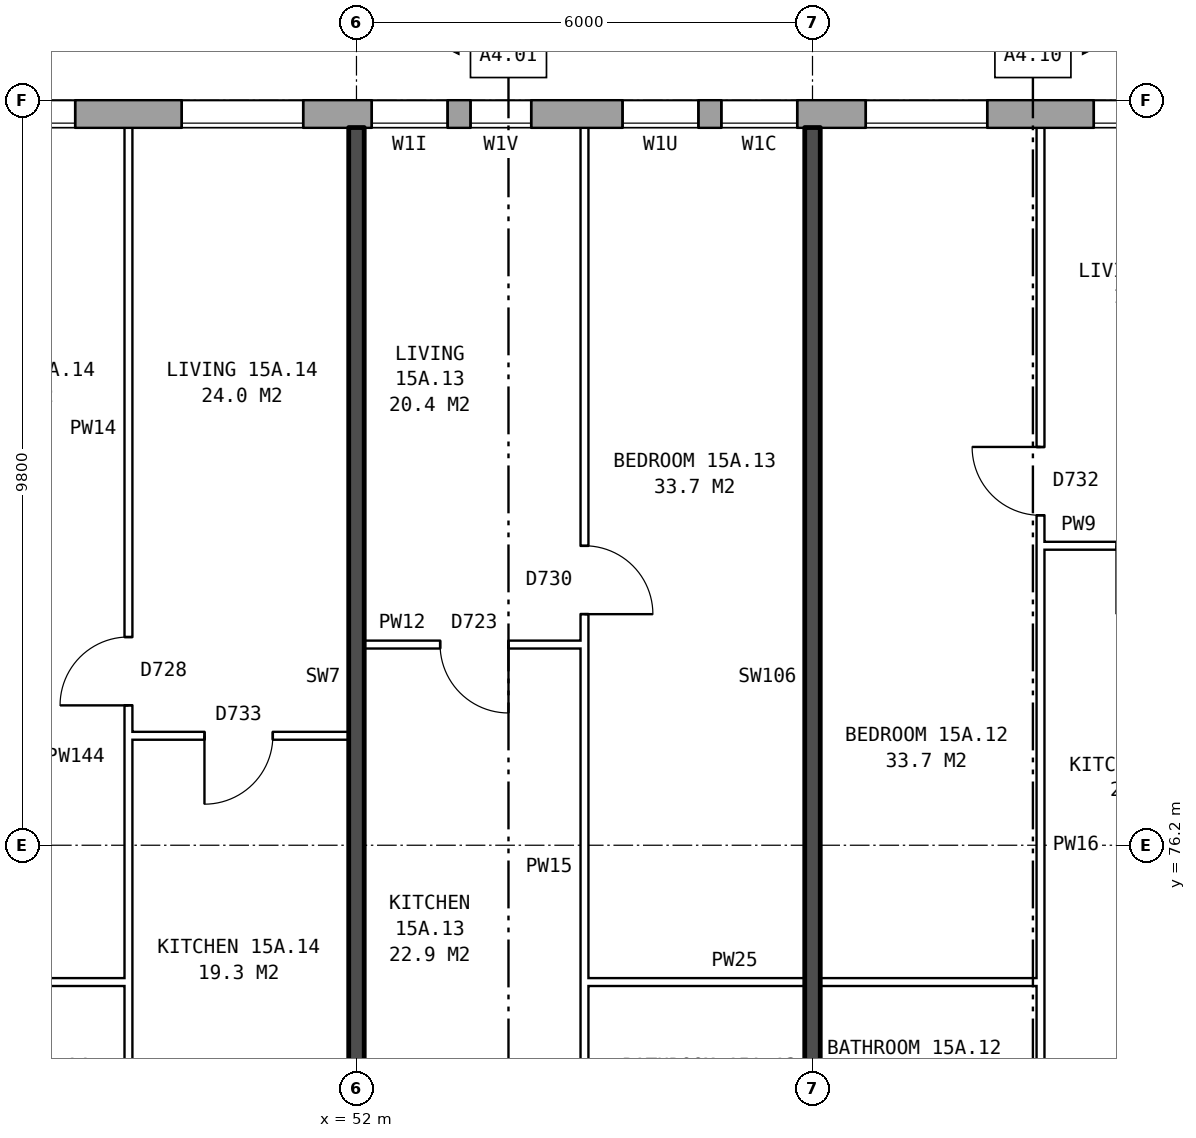
"""IFC4 building model, lengths in metres.
Left out: names, types, materials, properties, quantities, classifications, styles, units other than length and angle.
Written with IfcOpenShell. Run it as: python <this file> out.ifc"""

import sys

from ifc_helpers import new_model, si_unit, direction, frame, frame_2d, origin, place, context, subcontext, project, spatial, rectangle, extrude, element, fill, save


model = new_model("IFC4")
c1 = context("Model", 3, precision=1e-05, world=origin(), true_north=direction((0.0, 1.0)))
c2 = subcontext(c1, "Body", "Model", "MODEL_VIEW")
j1 = project(units=[si_unit("LENGTHUNIT", "METRE"), si_unit("PLANEANGLEUNIT", "RADIAN")], contexts=[c1])
p1 = place(None, origin())
s1 = spatial("IfcSite", under=j1, at=p1, CompositionType="ELEMENT")
p2 = place(p1, origin())
s2 = spatial("IfcBuilding", under=s1, at=p2, CompositionType="ELEMENT")
p3 = place(p2, frame((0.0, 0.0, 56.7)))
s3 = spatial("IfcBuildingStorey", under=s2, at=p3, CompositionType="ELEMENT", Elevation=56.7)
p4 = place(p3, frame((72.925, 85.82, 0.0), z_axis=(0.0, 0.0, 1.0), x_axis=(-1.0, 0.0, 0.0)))
e1 = element("IfcWall", 1, at=p4, inside=s3, PredefinedType="STANDARD", context=c2, shape_type="SweptSolid", body=[
    extrude(rectangle(XDim=48.351, YDim=0.36, at=frame_2d((24.175, 0.0))), origin(), (0.0, 0.0, 1.0), 2.85),
])
p5 = place(p4, frame((0.625, 0.0, 0.8)))
e2 = element("IfcOpeningElement", 2, at=p5, cuts=e1, PredefinedType="OPENING", context=c2, shape_type="SweptSolid", body=[
    extrude(rectangle(XDim=1.6, YDim=1.8, at=frame_2d((0.8, 0.9))), frame((0.0, 0.19, 0.0), z_axis=(0.0, -1.0, 0.0), x_axis=(1.0, 0.0, 0.0)), (0.0, 0.0, 1.0), 0.38),
])
p6 = place(p4, frame((3.625, 0.0, 0.8)))
e3 = element("IfcOpeningElement", 3, at=p6, cuts=e1, PredefinedType="OPENING", context=c2, shape_type="SweptSolid", body=[
    extrude(rectangle(XDim=1.6, YDim=1.8, at=frame_2d((0.8, 0.9))), frame((0.0, 0.19, 0.0), z_axis=(0.0, -1.0, 0.0), x_axis=(1.0, 0.0, 0.0)), (0.0, 0.0, 1.0), 0.38),
])
p7 = place(p4, frame((6.625, 0.0, 0.8)))
e4 = element("IfcOpeningElement", 4, at=p7, cuts=e1, PredefinedType="OPENING", context=c2, shape_type="SweptSolid", body=[
    extrude(rectangle(XDim=1.6, YDim=1.8, at=frame_2d((0.8, 0.9))), frame((0.0, 0.19, 0.0), z_axis=(0.0, -1.0, 0.0), x_axis=(1.0, 0.0, 0.0)), (0.0, 0.0, 1.0), 0.38),
])
p8 = place(p4, frame((9.625, 0.0, 0.8)))
e5 = element("IfcOpeningElement", 5, at=p8, cuts=e1, PredefinedType="OPENING", context=c2, shape_type="SweptSolid", body=[
    extrude(rectangle(XDim=1.6, YDim=1.8, at=frame_2d((0.8, 0.9))), frame((0.0, 0.19, 0.0), z_axis=(0.0, -1.0, 0.0), x_axis=(1.0, 0.0, 0.0)), (0.0, 0.0, 1.0), 0.38),
])
p9 = place(p4, frame((12.625, 0.0, 0.8)))
e6 = element("IfcOpeningElement", 6, at=p9, cuts=e1, PredefinedType="OPENING", context=c2, shape_type="SweptSolid", body=[
    extrude(rectangle(XDim=1.6, YDim=1.8, at=frame_2d((0.8, 0.9))), frame((0.0, 0.19, 0.0), z_axis=(0.0, -1.0, 0.0), x_axis=(1.0, 0.0, 0.0)), (0.0, 0.0, 1.0), 0.38),
])
p10 = place(p4, frame((15.125, 0.0, 0.8)))
e7 = element("IfcOpeningElement", 7, at=p10, cuts=e1, PredefinedType="OPENING", context=c2, shape_type="SweptSolid", body=[
    extrude(rectangle(XDim=1.0, YDim=1.8, at=frame_2d((0.5, 0.9))), frame((0.0, 0.19, 0.0), z_axis=(0.0, -1.0, 0.0), x_axis=(1.0, 0.0, 0.0)), (0.0, 0.0, 1.0), 0.38),
])
p11 = place(p4, frame((18.625, 0.0, 0.65)))
e8 = element("IfcOpeningElement", 8, at=p11, cuts=e1, PredefinedType="OPENING", context=c2, shape_type="SweptSolid", body=[
    extrude(rectangle(XDim=0.8, YDim=0.9, at=frame_2d((0.4, 0.45))), frame((0.0, 0.19, 0.0), z_axis=(0.0, -1.0, 0.0), x_axis=(1.0, 0.0, 0.0)), (0.0, 0.0, 1.0), 0.38),
])
p12 = place(p4, frame((21.625, 0.0, 0.8)))
e9 = element("IfcOpeningElement", 9, at=p12, cuts=e1, PredefinedType="OPENING", context=c2, shape_type="SweptSolid", body=[
    extrude(rectangle(XDim=1.6, YDim=1.8, at=frame_2d((0.8, 0.9))), frame((0.0, 0.19, 0.0), z_axis=(0.0, -1.0, 0.0), x_axis=(1.0, 0.0, 0.0)), (0.0, 0.0, 1.0), 0.38),
])
p13 = place(p4, frame((24.625, 0.0, 0.8)))
e10 = element("IfcOpeningElement", 10, at=p13, cuts=e1, PredefinedType="OPENING", context=c2, shape_type="SweptSolid", body=[
    extrude(rectangle(XDim=1.6, YDim=1.8, at=frame_2d((0.8, 0.9))), frame((0.0, 0.19, 0.0), z_axis=(0.0, -1.0, 0.0), x_axis=(1.0, 0.0, 0.0)), (0.0, 0.0, 1.0), 0.38),
])
p14 = place(p4, frame((27.125, 0.0, 0.8)))
e11 = element("IfcOpeningElement", 11, at=p14, cuts=e1, PredefinedType="OPENING", context=c2, shape_type="SweptSolid", body=[
    extrude(rectangle(XDim=1.0, YDim=1.8, at=frame_2d((0.5, 0.9))), frame((0.0, 0.19, 0.0), z_axis=(0.0, -1.0, 0.0), x_axis=(1.0, 0.0, 0.0)), (0.0, 0.0, 1.0), 0.38),
])
p15 = place(p4, frame((28.425, 0.0, 0.8)))
e12 = element("IfcOpeningElement", 12, at=p15, cuts=e1, PredefinedType="OPENING", context=c2, shape_type="SweptSolid", body=[
    extrude(rectangle(XDim=1.0, YDim=0.9, at=frame_2d((0.5, 0.45))), frame((0.0, 0.19, 0.0), z_axis=(0.0, -1.0, 0.0), x_axis=(1.0, 0.0, 0.0)), (0.0, 0.0, 1.0), 0.38),
])
p16 = place(p4, frame((33.625, 0.0, 0.8)))
e13 = element("IfcOpeningElement", 13, at=p16, cuts=e1, PredefinedType="OPENING", context=c2, shape_type="SweptSolid", body=[
    extrude(rectangle(XDim=1.6, YDim=1.8, at=frame_2d((0.8, 0.9))), frame((0.0, 0.19, 0.0), z_axis=(0.0, -1.0, 0.0), x_axis=(1.0, 0.0, 0.0)), (0.0, 0.0, 1.0), 0.38),
])
p17 = place(p4, frame((36.625, 0.0, 0.8)))
e14 = element("IfcOpeningElement", 14, at=p17, cuts=e1, PredefinedType="OPENING", context=c2, shape_type="SweptSolid", body=[
    extrude(rectangle(XDim=1.6, YDim=1.8, at=frame_2d((0.8, 0.9))), frame((0.0, 0.19, 0.0), z_axis=(0.0, -1.0, 0.0), x_axis=(1.0, 0.0, 0.0)), (0.0, 0.0, 1.0), 0.38),
])
p18 = place(p4, frame((39.625, 0.0, 0.8)))
e15 = element("IfcOpeningElement", 15, at=p18, cuts=e1, PredefinedType="OPENING", context=c2, shape_type="SweptSolid", body=[
    extrude(rectangle(XDim=1.6, YDim=1.8, at=frame_2d((0.8, 0.9))), frame((0.0, 0.19, 0.0), z_axis=(0.0, -1.0, 0.0), x_axis=(1.0, 0.0, 0.0)), (0.0, 0.0, 1.0), 0.38),
])
p19 = place(p4, frame((42.625, 0.0, 0.8)))
e16 = element("IfcOpeningElement", 16, at=p19, cuts=e1, PredefinedType="OPENING", context=c2, shape_type="SweptSolid", body=[
    extrude(rectangle(XDim=1.6, YDim=1.8, at=frame_2d((0.8, 0.9))), frame((0.0, 0.19, 0.0), z_axis=(0.0, -1.0, 0.0), x_axis=(1.0, 0.0, 0.0)), (0.0, 0.0, 1.0), 0.38),
])
p20 = place(p4, frame((45.625, 0.0, 0.8)))
e17 = element("IfcOpeningElement", 17, at=p20, cuts=e1, PredefinedType="OPENING", context=c2, shape_type="SweptSolid", body=[
    extrude(rectangle(XDim=1.6, YDim=1.8, at=frame_2d((0.8, 0.9))), frame((0.0, 0.19, 0.0), z_axis=(0.0, -1.0, 0.0), x_axis=(1.0, 0.0, 0.0)), (0.0, 0.0, 1.0), 0.38),
])
p21 = place(p4, frame((16.425, 0.0, 1.7)))
e18 = element("IfcOpeningElement", 18, at=p21, cuts=e1, PredefinedType="OPENING", context=c2, shape_type="SweptSolid", body=[
    extrude(rectangle(XDim=1.0, YDim=0.9, at=frame_2d((0.5, 0.45))), frame((0.0, 0.19, 0.0), z_axis=(0.0, -1.0, 0.0), x_axis=(1.0, 0.0, 0.0)), (0.0, 0.0, 1.0), 0.38),
])
p22 = place(p4, frame((19.725, 0.0, 0.75)))
e19 = element("IfcOpeningElement", 19, at=p22, cuts=e1, PredefinedType="OPENING", context=c2, shape_type="SweptSolid", body=[
    extrude(rectangle(XDim=1.0, YDim=1.5, at=frame_2d((0.5, 0.75))), frame((0.0, 0.19, 0.0), z_axis=(0.0, -1.0, 0.0), x_axis=(1.0, 0.0, 0.0)), (0.0, 0.0, 1.0), 0.38),
])
p23 = place(p4, frame((30.875, 0.0, 1.7)))
e20 = element("IfcOpeningElement", 20, at=p23, cuts=e1, PredefinedType="OPENING", context=c2, shape_type="SweptSolid", body=[
    extrude(rectangle(XDim=0.6, YDim=0.9, at=frame_2d((0.3, 0.45))), frame((0.0, 0.19, 0.0), z_axis=(0.0, -1.0, 0.0), x_axis=(1.0, 0.0, 0.0)), (0.0, 0.0, 1.0), 0.38),
])
p24 = place(p4, frame((31.775, 0.0, 1.1)))
e21 = element("IfcOpeningElement", 21, at=p24, cuts=e1, PredefinedType="OPENING", context=c2, shape_type="SweptSolid", body=[
    extrude(rectangle(XDim=0.8, YDim=1.5, at=frame_2d((0.4, 0.75))), frame((0.0, 0.19, 0.0), z_axis=(0.0, -1.0, 0.0), x_axis=(1.0, 0.0, 0.0)), (0.0, 0.0, 1.0), 0.38),
])
p25 = place(p3, frame((46.1, 74.4, 0.0), z_axis=(0.0, 0.0, 1.0), x_axis=(1.0, 0.0, 0.0)))
e22 = element("IfcWall", 22, at=p25, inside=s3, PredefinedType="PARTITIONING", context=c2, shape_type="SweptSolid", body=[
    extrude(rectangle(XDim=2.9, YDim=0.1, at=frame_2d((1.45, 0.0))), origin(), (0.0, 0.0, 1.0), 2.85),
])
p26 = place(p3, frame((55.0, 74.4, 0.0), z_axis=(0.0, 0.0, 1.0), x_axis=(1.0, 0.0, 0.0)))
e23 = element("IfcWall", 23, at=p26, inside=s3, PredefinedType="PARTITIONING", context=c2, shape_type="SweptSolid", body=[
    extrude(rectangle(XDim=6.0, YDim=0.1, at=frame_2d((3.0, 0.0))), origin(), (0.0, 0.0, 1.0), 2.85),
])
p27 = place(p3, frame((49.0, 77.64, 0.0), z_axis=(0.0, 0.0, 1.0), x_axis=(1.0, 0.0, 0.0)))
e24 = element("IfcWall", 24, at=p27, inside=s3, PredefinedType="PARTITIONING", context=c2, shape_type="SweptSolid", body=[
    extrude(rectangle(XDim=2.9, YDim=0.1, at=frame_2d((1.45, 0.0))), origin(), (0.0, 0.0, 1.0), 2.85),
])
p28 = place(p27, frame((1.0, 0.0, 0.0)))
e25 = element("IfcOpeningElement", 25, at=p28, cuts=e24, PredefinedType="OPENING", context=c2, shape_type="SweptSolid", body=[
    extrude(rectangle(XDim=0.9, YDim=2.1, at=frame_2d((0.45, 1.05))), frame((0.0, 0.06, 0.0), z_axis=(0.0, -1.0, 0.0), x_axis=(1.0, 0.0, 0.0)), (0.0, 0.0, 1.0), 0.12),
])
p29 = place(p3, frame((52.1, 78.84, 0.0), z_axis=(0.0, 0.0, 1.0), x_axis=(1.0, 0.0, 0.0)))
e26 = element("IfcWall", 26, at=p29, inside=s3, PredefinedType="PARTITIONING", context=c2, shape_type="SweptSolid", body=[
    extrude(rectangle(XDim=2.9, YDim=0.1, at=frame_2d((1.45, 0.0))), origin(), (0.0, 0.0, 1.0), 2.85),
])
p30 = place(p29, frame((1.0, 0.0, 0.0)))
e27 = element("IfcOpeningElement", 27, at=p30, cuts=e26, PredefinedType="OPENING", context=c2, shape_type="SweptSolid", body=[
    extrude(rectangle(XDim=0.9, YDim=2.1, at=frame_2d((0.45, 1.05))), frame((0.0, 0.06, 0.0), z_axis=(0.0, -1.0, 0.0), x_axis=(1.0, 0.0, 0.0)), (0.0, 0.0, 1.0), 0.12),
])
p31 = place(p3, frame((61.0, 80.14, 0.0), z_axis=(0.0, 0.0, 1.0), x_axis=(1.0, 0.0, 0.0)))
e28 = element("IfcWall", 28, at=p31, inside=s3, PredefinedType="PARTITIONING", context=c2, shape_type="SweptSolid", body=[
    extrude(rectangle(XDim=2.9, YDim=0.1, at=frame_2d((1.45, 0.0))), origin(), (0.0, 0.0, 1.0), 2.85),
])
p32 = place(p31, frame((1.0, 0.0, 0.0)))
e29 = element("IfcOpeningElement", 29, at=p32, cuts=e28, PredefinedType="OPENING", context=c2, shape_type="SweptSolid", body=[
    extrude(rectangle(XDim=0.9, YDim=2.1, at=frame_2d((0.45, 1.05))), frame((0.0, 0.06, 0.0), z_axis=(0.0, -1.0, 0.0), x_axis=(1.0, 0.0, 0.0)), (0.0, 0.0, 1.0), 0.12),
])
p33 = place(p3, frame((49.0, 71.3, 0.0), z_axis=(0.0, 0.0, 1.0), x_axis=(0.0, 1.0, 0.0)))
e30 = element("IfcWall", 30, at=p33, inside=s3, PredefinedType="PARTITIONING", context=c2, shape_type="SweptSolid", body=[
    extrude(rectangle(XDim=14.34, YDim=0.1, at=frame_2d((7.17, 0.0))), origin(), (0.0, 0.0, 1.0), 2.85),
])
p34 = place(p33, frame((6.74, 0.0, 0.0)))
e31 = element("IfcOpeningElement", 31, at=p34, cuts=e30, PredefinedType="OPENING", context=c2, shape_type="SweptSolid", body=[
    extrude(rectangle(XDim=0.9, YDim=2.1, at=frame_2d((0.45, 1.05))), frame((0.0, 0.06, 0.0), z_axis=(0.0, -1.0, 0.0), x_axis=(1.0, 0.0, 0.0)), (0.0, 0.0, 1.0), 0.12),
])
p35 = place(p33, frame((0.4, 0.0, 0.0)))
e32 = element("IfcOpeningElement", 32, at=p35, cuts=e30, PredefinedType="OPENING", context=c2, shape_type="SweptSolid", body=[
    extrude(rectangle(XDim=0.9, YDim=2.1, at=frame_2d((0.45, 1.05))), frame((0.0, 0.06, 0.0), z_axis=(0.0, -1.0, 0.0), x_axis=(1.0, 0.0, 0.0)), (0.0, 0.0, 1.0), 0.12),
])
p36 = place(p3, frame((52.0, 71.2, 0.0), z_axis=(0.0, 0.0, 1.0), x_axis=(0.0, 1.0, 0.0)))
e33 = element("IfcWall", 33, at=p36, inside=s3, PredefinedType="SOLIDWALL", context=c2, shape_type="SweptSolid", body=[
    extrude(rectangle(XDim=14.44, YDim=0.2, at=frame_2d((7.22, 0.0))), origin(), (0.0, 0.0, 1.0), 2.85),
])
p37 = place(p3, frame((55.0, 71.3, 0.0), z_axis=(0.0, 0.0, 1.0), x_axis=(0.0, 1.0, 0.0)))
e34 = element("IfcWall", 34, at=p37, inside=s3, PredefinedType="PARTITIONING", context=c2, shape_type="SweptSolid", body=[
    extrude(rectangle(XDim=14.34, YDim=0.1, at=frame_2d((7.17, 0.0))), origin(), (0.0, 0.0, 1.0), 2.85),
])
p38 = place(p37, frame((7.94, 0.0, 0.0)))
e35 = element("IfcOpeningElement", 35, at=p38, cuts=e34, PredefinedType="OPENING", context=c2, shape_type="SweptSolid", body=[
    extrude(rectangle(XDim=0.9, YDim=2.1, at=frame_2d((0.45, 1.05))), frame((0.0, 0.06, 0.0), z_axis=(0.0, -1.0, 0.0), x_axis=(1.0, 0.0, 0.0)), (0.0, 0.0, 1.0), 0.12),
])
p39 = place(p37, frame((0.4, 0.0, 0.0)))
e36 = element("IfcOpeningElement", 36, at=p39, cuts=e34, PredefinedType="OPENING", context=c2, shape_type="SweptSolid", body=[
    extrude(rectangle(XDim=0.9, YDim=2.1, at=frame_2d((0.45, 1.05))), frame((0.0, 0.06, 0.0), z_axis=(0.0, -1.0, 0.0), x_axis=(1.0, 0.0, 0.0)), (0.0, 0.0, 1.0), 0.12),
])
p40 = place(p3, frame((58.0, 71.2, 0.0), z_axis=(0.0, 0.0, 1.0), x_axis=(0.0, 1.0, 0.0)))
e37 = element("IfcWall", 37, at=p40, inside=s3, PredefinedType="SOLIDWALL", context=c2, shape_type="SweptSolid", body=[
    extrude(rectangle(XDim=14.44, YDim=0.2, at=frame_2d((7.22, 0.0))), origin(), (0.0, 0.0, 1.0), 2.85),
])
p41 = place(p3, frame((61.0, 71.3, 0.0), z_axis=(0.0, 0.0, 1.0), x_axis=(0.0, 1.0, 0.0)))
e38 = element("IfcWall", 38, at=p41, inside=s3, PredefinedType="PARTITIONING", context=c2, shape_type="SweptSolid", body=[
    extrude(rectangle(XDim=14.34, YDim=0.1, at=frame_2d((7.17, 0.0))), origin(), (0.0, 0.0, 1.0), 2.85),
])
p42 = place(p41, frame((9.24, 0.0, 0.0)))
e39 = element("IfcOpeningElement", 39, at=p42, cuts=e38, PredefinedType="OPENING", context=c2, shape_type="SweptSolid", body=[
    extrude(rectangle(XDim=0.9, YDim=2.1, at=frame_2d((0.45, 1.05))), frame((0.0, 0.06, 0.0), z_axis=(0.0, -1.0, 0.0), x_axis=(1.0, 0.0, 0.0)), (0.0, 0.0, 1.0), 0.12),
])
p43 = place(p41, frame((0.9, 0.0, 0.0)))
e40 = element("IfcOpeningElement", 40, at=p43, cuts=e38, PredefinedType="OPENING", context=c2, shape_type="SweptSolid", body=[
    extrude(rectangle(XDim=0.9, YDim=2.1, at=frame_2d((0.45, 1.05))), frame((0.0, 0.06, 0.0), z_axis=(0.0, -1.0, 0.0), x_axis=(1.0, 0.0, 0.0)), (0.0, 0.0, 1.0), 0.12),
])
p44 = place(p8, origin())
e41 = element("IfcWindow", 41, at=p44, inside=s3, PartitioningType="SINGLE_PANEL", PredefinedType="WINDOW", context=c2, shape_type="SweptSolid", body=[
    extrude(rectangle(XDim=1.6, YDim=1.8, at=frame_2d((0.8, 0.9))), frame((0.0, 0.15, 0.0), z_axis=(0.0, -1.0, 0.0), x_axis=(1.0, 0.0, 0.0)), (0.0, 0.0, 1.0), 0.06),
])
fill(e5, e41)
p45 = place(p9, origin())
e42 = element("IfcWindow", 42, at=p45, inside=s3, PartitioningType="SINGLE_PANEL", PredefinedType="WINDOW", context=c2, shape_type="SweptSolid", body=[
    extrude(rectangle(XDim=1.6, YDim=1.8, at=frame_2d((0.8, 0.9))), frame((0.0, 0.15, 0.0), z_axis=(0.0, -1.0, 0.0), x_axis=(1.0, 0.0, 0.0)), (0.0, 0.0, 1.0), 0.06),
])
fill(e6, e42)
p46 = place(p10, origin())
e43 = element("IfcWindow", 43, at=p46, inside=s3, PartitioningType="SINGLE_PANEL", PredefinedType="WINDOW", context=c2, shape_type="SweptSolid", body=[
    extrude(rectangle(XDim=1.0, YDim=1.8, at=frame_2d((0.5, 0.9))), frame((0.0, 0.15, 0.0), z_axis=(0.0, -1.0, 0.0), x_axis=(1.0, 0.0, 0.0)), (0.0, 0.0, 1.0), 0.06),
])
fill(e7, e43)
p47 = place(p11, origin())
e44 = element("IfcWindow", 44, at=p47, inside=s3, PartitioningType="SINGLE_PANEL", PredefinedType="WINDOW", context=c2, shape_type="SweptSolid", body=[
    extrude(rectangle(XDim=0.8, YDim=0.9, at=frame_2d((0.4, 0.45))), frame((0.0, 0.15, 0.0), z_axis=(0.0, -1.0, 0.0), x_axis=(1.0, 0.0, 0.0)), (0.0, 0.0, 1.0), 0.06),
])
fill(e8, e44)
p48 = place(p12, origin())
e45 = element("IfcWindow", 45, at=p48, inside=s3, PartitioningType="SINGLE_PANEL", PredefinedType="WINDOW", context=c2, shape_type="SweptSolid", body=[
    extrude(rectangle(XDim=1.6, YDim=1.8, at=frame_2d((0.8, 0.9))), frame((0.0, 0.15, 0.0), z_axis=(0.0, -1.0, 0.0), x_axis=(1.0, 0.0, 0.0)), (0.0, 0.0, 1.0), 0.06),
])
fill(e9, e45)
p49 = place(p13, origin())
e46 = element("IfcWindow", 46, at=p49, inside=s3, PartitioningType="SINGLE_PANEL", PredefinedType="WINDOW", context=c2, shape_type="SweptSolid", body=[
    extrude(rectangle(XDim=1.6, YDim=1.8, at=frame_2d((0.8, 0.9))), frame((0.0, 0.15, 0.0), z_axis=(0.0, -1.0, 0.0), x_axis=(1.0, 0.0, 0.0)), (0.0, 0.0, 1.0), 0.06),
])
fill(e10, e46)
p50 = place(p42, origin())
e47 = element("IfcDoor", 47, at=p50, inside=s3, OperationType="SINGLE_SWING_RIGHT", PredefinedType="DOOR", context=c2, shape_type="SweptSolid", body=[
    extrude(rectangle(XDim=0.9, YDim=2.1, at=frame_2d((0.45, 1.05))), frame((0.0, 0.025, 0.0), z_axis=(0.0, -1.0, 0.0), x_axis=(1.0, 0.0, 0.0)), (0.0, 0.0, 1.0), 0.05),
])
fill(e39, e47)
p51 = place(p38, frame((0.9, 0.0, 0.0), z_axis=(0.0, 0.0, 1.0), x_axis=(-1.0, 0.0, 0.0)))
e48 = element("IfcDoor", 48, at=p51, inside=s3, OperationType="SINGLE_SWING_RIGHT", PredefinedType="DOOR", context=c2, shape_type="SweptSolid", body=[
    extrude(rectangle(XDim=0.9, YDim=2.1, at=frame_2d((0.45, 1.05))), frame((0.0, 0.025, 0.0), z_axis=(0.0, -1.0, 0.0), x_axis=(1.0, 0.0, 0.0)), (0.0, 0.0, 1.0), 0.05),
])
fill(e35, e48)
p52 = place(p30, frame((0.9, 0.0, 0.0), z_axis=(0.0, 0.0, 1.0), x_axis=(-1.0, 0.0, 0.0)))
e49 = element("IfcDoor", 49, at=p52, inside=s3, OperationType="SINGLE_SWING_LEFT", PredefinedType="DOOR", context=c2, shape_type="SweptSolid", body=[
    extrude(rectangle(XDim=0.9, YDim=2.1, at=frame_2d((0.45, 1.05))), frame((0.0, 0.025, 0.0), z_axis=(0.0, -1.0, 0.0), x_axis=(1.0, 0.0, 0.0)), (0.0, 0.0, 1.0), 0.05),
])
fill(e27, e49)
p53 = place(p34, origin())
e50 = element("IfcDoor", 50, at=p53, inside=s3, OperationType="SINGLE_SWING_LEFT", PredefinedType="DOOR", context=c2, shape_type="SweptSolid", body=[
    extrude(rectangle(XDim=0.9, YDim=2.1, at=frame_2d((0.45, 1.05))), frame((0.0, 0.025, 0.0), z_axis=(0.0, -1.0, 0.0), x_axis=(1.0, 0.0, 0.0)), (0.0, 0.0, 1.0), 0.05),
])
fill(e31, e50)
p54 = place(p28, frame((0.9, 0.0, 0.0), z_axis=(0.0, 0.0, 1.0), x_axis=(-1.0, 0.0, 0.0)))
e51 = element("IfcDoor", 51, at=p54, inside=s3, OperationType="SINGLE_SWING_RIGHT", PredefinedType="DOOR", context=c2, shape_type="SweptSolid", body=[
    extrude(rectangle(XDim=0.9, YDim=2.1, at=frame_2d((0.45, 1.05))), frame((0.0, 0.025, 0.0), z_axis=(0.0, -1.0, 0.0), x_axis=(1.0, 0.0, 0.0)), (0.0, 0.0, 1.0), 0.05),
])
fill(e25, e51)
p55 = place(p21, origin())
e52 = element("IfcWindow", 52, at=p55, inside=s3, PartitioningType="SINGLE_PANEL", PredefinedType="WINDOW", context=c2, shape_type="SweptSolid", body=[
    extrude(rectangle(XDim=1.0, YDim=0.9, at=frame_2d((0.5, 0.45))), frame((0.0, 0.15, 0.0), z_axis=(0.0, -1.0, 0.0), x_axis=(1.0, 0.0, 0.0)), (0.0, 0.0, 1.0), 0.06),
])
fill(e18, e52)
p56 = place(p22, origin())
e53 = element("IfcWindow", 53, at=p56, inside=s3, PartitioningType="SINGLE_PANEL", PredefinedType="WINDOW", context=c2, shape_type="SweptSolid", body=[
    extrude(rectangle(XDim=1.0, YDim=1.5, at=frame_2d((0.5, 0.75))), frame((0.0, 0.15, 0.0), z_axis=(0.0, -1.0, 0.0), x_axis=(1.0, 0.0, 0.0)), (0.0, 0.0, 1.0), 0.06),
])
fill(e19, e53)
save(model, sys.argv[1])
